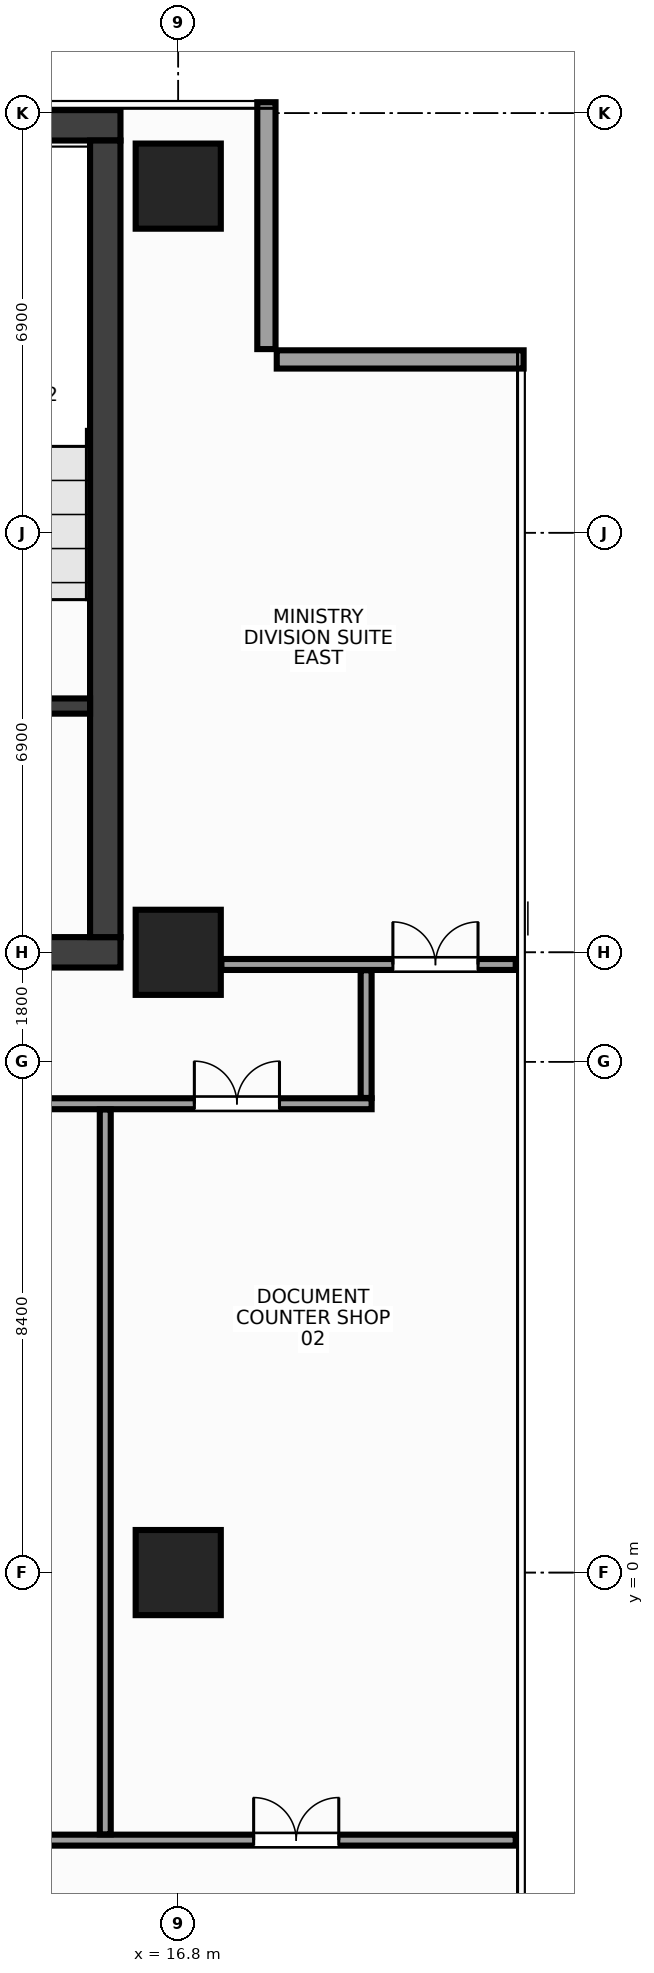
"""IFC4 building model, lengths in metres.
Left out: names, types, materials, properties, quantities, classifications, styles, units other than length and angle.
Written with IfcOpenShell. Run it as: python <this file> out.ifc"""

import sys

from ifc_helpers import new_model, si_unit, direction, frame, frame_2d, origin, origin_2d, place, context, subcontext, project, spatial, rectangle, extrude, source, transform, mapped, element, fill, save


model = new_model("IFC4")
c1 = context("Model", 3, precision=1e-05, world=origin(), true_north=direction((0.0, 1.0)))
c2 = subcontext(c1, "Body", "Model", "MODEL_VIEW")
j1 = project(units=[si_unit("LENGTHUNIT", "METRE"), si_unit("PLANEANGLEUNIT", "RADIAN")], contexts=[c1])
p1 = place(None, origin())
s1 = spatial("IfcSite", under=j1, at=p1, CompositionType="ELEMENT")
p2 = place(p1, origin())
s2 = spatial("IfcBuilding", under=s1, at=p2, CompositionType="ELEMENT")
p3 = place(p2, frame((0.0, 0.0, 268.4)))
s3 = spatial("IfcBuildingStorey", under=s2, at=p3, CompositionType="ELEMENT", Elevation=268.4)
m1 = source(origin(), c2, "Body", "SweptSolid", [
    extrude(rectangle(XDim=31.7, YDim=0.5, at=frame_2d((15.85, 0.0))), origin(), (0.0, 0.0, 1.0), 3.6),
])
p4 = place(p3, frame((-15.85, 23.8, 0.0), z_axis=(0.0, 0.0, 1.0), x_axis=(1.0, 0.0, 0.0)))
e1 = element("IfcWall", 1, at=p4, inside=s3, PredefinedType="SHEAR", context=c2, shape_type="MappedRepresentation", body=[
    mapped(m1, transform((0.0, 0.0, 0.0), x_axis=(1.0, 0.0, 0.0), y_axis=(0.0, 1.0, 0.0), z_axis=(0.0, 0.0, 1.0), scale=1.0)),
])
p5 = place(p3, frame((-15.85, 10.2, 0.0), z_axis=(0.0, 0.0, 1.0), x_axis=(1.0, 0.0, 0.0)))
e2 = element("IfcWall", 2, at=p5, inside=s3, PredefinedType="SHEAR", context=c2, shape_type="MappedRepresentation", body=[
    mapped(m1, transform((0.0, 0.0, 0.0), x_axis=(1.0, 0.0, 0.0), y_axis=(0.0, 1.0, 0.0), z_axis=(0.0, 0.0, 1.0), scale=1.0)),
])
p6 = place(p5, frame((1.7, 0.0, 0.0)))
e3 = element("IfcOpeningElement", 3, at=p6, cuts=e2, PredefinedType="OPENING", context=c2, shape_type="SweptSolid", body=[
    extrude(rectangle(XDim=1.6, YDim=2.15, at=frame_2d((0.8, 1.075))), frame((0.0, 0.262, 0.0), z_axis=(0.0, -1.0, 0.0), x_axis=(1.0, 0.0, 0.0)), (0.0, 0.0, 1.0), 0.524),
])
p7 = place(p5, frame((28.4, 0.0, 0.0)))
e4 = element("IfcOpeningElement", 4, at=p7, cuts=e2, PredefinedType="OPENING", context=c2, shape_type="SweptSolid", body=[
    extrude(rectangle(XDim=1.6, YDim=2.15, at=frame_2d((0.8, 1.075))), frame((0.0, 0.262, 0.0), z_axis=(0.0, -1.0, 0.0), x_axis=(1.0, 0.0, 0.0)), (0.0, 0.0, 1.0), 0.524),
])
p8 = place(p5, frame((15.1, 0.0, 0.0)))
e5 = element("IfcOpeningElement", 5, at=p8, cuts=e2, PredefinedType="OPENING", context=c2, shape_type="SweptSolid", body=[
    extrude(rectangle(XDim=1.5, YDim=2.2, at=frame_2d((0.75, 1.1))), frame((0.0, 0.262, 0.0), z_axis=(0.0, -1.0, 0.0), x_axis=(1.0, 0.0, 0.0)), (0.0, 0.0, 1.0), 0.524),
])
m2 = source(origin(), c2, "Body", "SweptSolid", [
    extrude(rectangle(XDim=13.1, YDim=0.5, at=frame_2d((6.55, 0.0))), origin(), (0.0, 0.0, 1.0), 3.6),
])
p9 = place(p3, frame((15.6, 10.45, 0.0), z_axis=(0.0, 0.0, 1.0), x_axis=(0.0, 1.0, 0.0)))
e6 = element("IfcWall", 6, at=p9, inside=s3, PredefinedType="SHEAR", context=c2, shape_type="MappedRepresentation", body=[
    mapped(m2, transform((0.0, 0.0, 0.0), x_axis=(1.0, 0.0, 0.0), y_axis=(0.0, 1.0, 0.0), z_axis=(0.0, 0.0, 1.0), scale=1.0)),
])
m3 = source(origin(), c2, "Body", "SweptSolid", [
    extrude(rectangle(XDim=3.705, YDim=0.25, at=frame_2d((1.853, 0.0))), origin(), (0.0, 0.0, 1.0), 3.6),
])
p10 = place(p3, frame((11.645, 14.25, 0.0), z_axis=(0.0, 0.0, 1.0), x_axis=(1.0, 0.0, 0.0)))
e7 = element("IfcWall", 7, at=p10, inside=s3, PredefinedType="SHEAR", context=c2, shape_type="MappedRepresentation", body=[
    mapped(m3, transform((0.0, 0.0, 0.0), x_axis=(1.0, 0.0, 0.0), y_axis=(0.0, 1.0, 0.0), z_axis=(0.0, 0.0, 1.0), scale=1.0)),
])
p11 = place(p10, frame((0.95, 0.0, 0.0)))
e8 = element("IfcOpeningElement", 8, at=p11, cuts=e7, PredefinedType="OPENING", context=c2, shape_type="SweptSolid", body=[
    extrude(rectangle(XDim=1.6, YDim=2.15, at=frame_2d((0.8, 1.075))), frame((0.0, 0.137, 0.0), z_axis=(0.0, -1.0, 0.0), x_axis=(1.0, 0.0, 0.0)), (0.0, 0.0, 1.0), 0.274),
])
m4 = source(origin(), c2, "Body", "SweptSolid", [
    extrude(rectangle(XDim=1.4, YDim=1.4, at=origin_2d()), origin(), (0.0, 0.0, 1.0), 3.6),
])
for number, where, z_axis, x_axis in (
    (9, (16.8, 0.0, 0.0), (0.0, 0.0, 1.0), (1.0, 0.0, 0.0)),
    (10, (16.8, 10.2, 0.0), (0.0, 0.0, 1.0), (1.0, 0.0, 0.0)),
    (11, (16.8, 22.8, 0.0), (0.0, 0.0, 1.0), (1.0, 0.0, 0.0)),
):
    element("IfcColumn", number, at=place(p3, frame(where, z_axis=z_axis, x_axis=x_axis)), inside=s3, PredefinedType="COLUMN", context=c2, shape_type="MappedRepresentation", body=[
        mapped(m4, transform((0.0, 0.0, 0.0), x_axis=(1.0, 0.0, 0.0), y_axis=(0.0, 1.0, 0.0), z_axis=(0.0, 0.0, 1.0), scale=1.0)),
    ])
m5 = source(origin(), c2, "Body", "SweptSolid", [
    extrude(rectangle(XDim=4.06, YDim=0.3, at=frame_2d((2.03, 0.0))), origin(), (0.0, 0.0, 1.0), 2.75),
])
p12 = place(p3, frame((22.48, 19.95, 0.0), z_axis=(0.0, 0.0, 1.0), x_axis=(-1.0, 0.0, 0.0)))
e12 = element("IfcWall", 12, at=p12, inside=s3, PredefinedType="STANDARD", context=c2, shape_type="MappedRepresentation", body=[
    mapped(m5, transform((0.0, 0.0, 0.0), x_axis=(1.0, 0.0, 0.0), y_axis=(0.0, 1.0, 0.0), z_axis=(0.0, 0.0, 1.0), scale=1.0)),
])
m6 = source(origin(), c2, "Body", "SweptSolid", [
    extrude(rectangle(XDim=4.06, YDim=0.3, at=frame_2d((2.03, 0.0))), origin(), (0.0, 0.0, 1.0), 2.75),
])
p13 = place(p3, frame((18.25, 20.12, 0.0), z_axis=(0.0, 0.0, 1.0), x_axis=(0.0, 1.0, 0.0)))
e13 = element("IfcWall", 13, at=p13, inside=s3, PredefinedType="STANDARD", context=c2, shape_type="MappedRepresentation", body=[
    mapped(m6, transform((0.0, 0.0, 0.0), x_axis=(1.0, 0.0, 0.0), y_axis=(0.0, 1.0, 0.0), z_axis=(0.0, 0.0, 1.0), scale=1.0)),
])
m7 = source(origin(), c2, "Body", "SweptSolid", [
    extrude(rectangle(XDim=4.84, YDim=0.18, at=frame_2d((2.42, 0.0))), origin(), (0.0, 0.0, 1.0), 2.805),
])
p14 = place(p3, frame((17.51, 10.0, 0.0), z_axis=(0.0, 0.0, 1.0), x_axis=(1.0, 0.0, 0.0)))
e14 = element("IfcWall", 14, at=p14, inside=s3, PredefinedType="PARTITIONING", context=c2, shape_type="MappedRepresentation", body=[
    mapped(m7, transform((0.0, 0.0, 0.0), x_axis=(1.0, 0.0, 0.0), y_axis=(0.0, 1.0, 0.0), z_axis=(0.0, 0.0, 1.0), scale=1.0)),
])
p15 = place(p14, frame((2.82, 0.0, 0.0)))
e15 = element("IfcOpeningElement", 15, at=p15, cuts=e14, PredefinedType="OPENING", context=c2, shape_type="SweptSolid", body=[
    extrude(rectangle(XDim=1.4, YDim=2.2, at=frame_2d((0.7, 1.1))), frame((0.0, 0.102, 0.0), z_axis=(0.0, -1.0, 0.0), x_axis=(1.0, 0.0, 0.0)), (0.0, 0.0, 1.0), 0.204),
])
m8 = source(origin(), c2, "Body", "SweptSolid", [
    extrude(rectangle(XDim=21.9, YDim=0.18, at=frame_2d((10.95, 0.0))), origin(), (0.0, 0.0, 1.0), 2.755),
])
p16 = place(p3, frame((-1.92, 7.71, 0.0), z_axis=(0.0, 0.0, 1.0), x_axis=(1.0, 0.0, 0.0)))
e16 = element("IfcWall", 16, at=p16, inside=s3, PredefinedType="PARTITIONING", context=c2, shape_type="MappedRepresentation", body=[
    mapped(m8, transform((0.0, 0.0, 0.0), x_axis=(1.0, 0.0, 0.0), y_axis=(0.0, 1.0, 0.0), z_axis=(0.0, 0.0, 1.0), scale=1.0)),
])
p17 = place(p16, frame((18.985, 0.0, 0.0)))
e17 = element("IfcOpeningElement", 17, at=p17, cuts=e16, PredefinedType="OPENING", context=c2, shape_type="SweptSolid", body=[
    extrude(rectangle(XDim=1.4, YDim=2.2, at=frame_2d((0.7, 1.1))), frame((0.0, 0.102, 0.0), z_axis=(0.0, -1.0, 0.0), x_axis=(1.0, 0.0, 0.0)), (0.0, 0.0, 1.0), 0.204),
])
p18 = place(p16, frame((2.675, 0.0, 0.0)))
e18 = element("IfcOpeningElement", 18, at=p18, cuts=e16, PredefinedType="OPENING", context=c2, shape_type="SweptSolid", body=[
    extrude(rectangle(XDim=1.4, YDim=2.2, at=frame_2d((0.7, 1.1))), frame((0.0, 0.102, 0.0), z_axis=(0.0, -1.0, 0.0), x_axis=(1.0, 0.0, 0.0)), (0.0, 0.0, 1.0), 0.204),
])
p19 = place(p16, frame((11.42, 0.0, 0.0)))
e19 = element("IfcOpeningElement", 19, at=p19, cuts=e16, PredefinedType="OPENING", context=c2, shape_type="SweptSolid", body=[
    extrude(rectangle(XDim=1.4, YDim=2.2, at=frame_2d((0.7, 1.1))), frame((0.0, 0.102, 0.0), z_axis=(0.0, -1.0, 0.0), x_axis=(1.0, 0.0, 0.0)), (0.0, 0.0, 1.0), 0.204),
])
m9 = source(origin(), c2, "Body", "SweptSolid", [
    extrude(rectangle(XDim=2.1, YDim=0.18, at=frame_2d((1.05, 0.0))), origin(), (0.0, 0.0, 1.0), 3.37),
])
p20 = place(p3, frame((19.89, 7.805, 0.0), z_axis=(0.0, 0.0, 1.0), x_axis=(0.0, 1.0, 0.0)))
e20 = element("IfcWall", 20, at=p20, inside=s3, PredefinedType="PARTITIONING", context=c2, shape_type="MappedRepresentation", body=[
    mapped(m9, transform((0.0, 0.0, 0.0), x_axis=(1.0, 0.0, 0.0), y_axis=(0.0, 1.0, 0.0), z_axis=(0.0, 0.0, 1.0), scale=1.0)),
])
m10 = source(origin(), c2, "Body", "SweptSolid", [
    extrude(rectangle(XDim=24.265, YDim=0.18, at=frame_2d((12.133, 0.0))), origin(), (0.0, 0.0, 1.0), 2.755),
])
p21 = place(p3, frame((-1.915, -4.4, 0.0), z_axis=(0.0, 0.0, 1.0), x_axis=(1.0, 0.0, 0.0)))
e21 = element("IfcWall", 21, at=p21, inside=s3, PredefinedType="PARTITIONING", context=c2, shape_type="MappedRepresentation", body=[
    mapped(m10, transform((0.0, 0.0, 0.0), x_axis=(1.0, 0.0, 0.0), y_axis=(0.0, 1.0, 0.0), z_axis=(0.0, 0.0, 1.0), scale=1.0)),
])
p22 = place(p21, frame((19.955, 0.0, 0.0)))
e22 = element("IfcOpeningElement", 22, at=p22, cuts=e21, PredefinedType="OPENING", context=c2, shape_type="SweptSolid", body=[
    extrude(rectangle(XDim=1.4, YDim=2.2, at=frame_2d((0.7, 1.1))), frame((0.0, 0.102, 0.0), z_axis=(0.0, -1.0, 0.0), x_axis=(1.0, 0.0, 0.0)), (0.0, 0.0, 1.0), 0.204),
])
m11 = source(origin(), c2, "Body", "SweptSolid", [
    extrude(rectangle(XDim=11.92, YDim=0.18, at=frame_2d((5.96, 0.0))), origin(), (0.0, 0.0, 1.0), 2.655),
])
p23 = place(p3, frame((15.6, -4.305, 0.0), z_axis=(0.0, 0.0, 1.0), x_axis=(0.0, 1.0, 0.0)))
e23 = element("IfcWall", 23, at=p23, inside=s3, PredefinedType="PARTITIONING", context=c2, shape_type="MappedRepresentation", body=[
    mapped(m11, transform((0.0, 0.0, 0.0), x_axis=(1.0, 0.0, 0.0), y_axis=(0.0, 1.0, 0.0), z_axis=(0.0, 0.0, 1.0), scale=1.0)),
])
m12 = source(origin(), c2, "Body", "SweptSolid", [
    extrude(rectangle(XDim=1.4, YDim=2.2, at=frame_2d((0.7, 1.1))), frame((0.0, 0.025, 0.0), z_axis=(0.0, -1.0, 0.0), x_axis=(1.0, 0.0, 0.0)), (0.0, 0.0, 1.0), 0.05),
])
p24 = place(p17, origin())
e24 = element("IfcDoor", 24, at=p24, inside=s3, OperationType="DOUBLE_DOOR_SINGLE_SWING", PredefinedType="DOOR", context=c2, shape_type="MappedRepresentation", body=[
    mapped(m12, transform((0.0, 0.0, 0.0), x_axis=(1.0, 0.0, 0.0), y_axis=(0.0, 1.0, 0.0), z_axis=(0.0, 0.0, 1.0), scale=1.0)),
])
fill(e17, e24)
p25 = place(p15, origin())
e25 = element("IfcDoor", 25, at=p25, inside=s3, OperationType="DOUBLE_DOOR_SINGLE_SWING", PredefinedType="DOOR", context=c2, shape_type="MappedRepresentation", body=[
    mapped(m12, transform((0.0, 0.0, 0.0), x_axis=(1.0, 0.0, 0.0), y_axis=(0.0, 1.0, 0.0), z_axis=(0.0, 0.0, 1.0), scale=1.0)),
])
fill(e15, e25)
p26 = place(p22, origin())
e26 = element("IfcDoor", 26, at=p26, inside=s3, OperationType="DOUBLE_DOOR_SINGLE_SWING", PredefinedType="DOOR", context=c2, shape_type="MappedRepresentation", body=[
    mapped(m12, transform((0.0, 0.0, 0.0), x_axis=(1.0, 0.0, 0.0), y_axis=(0.0, 1.0, 0.0), z_axis=(0.0, 0.0, 1.0), scale=1.0)),
])
fill(e22, e26)
save(model, sys.argv[1])
